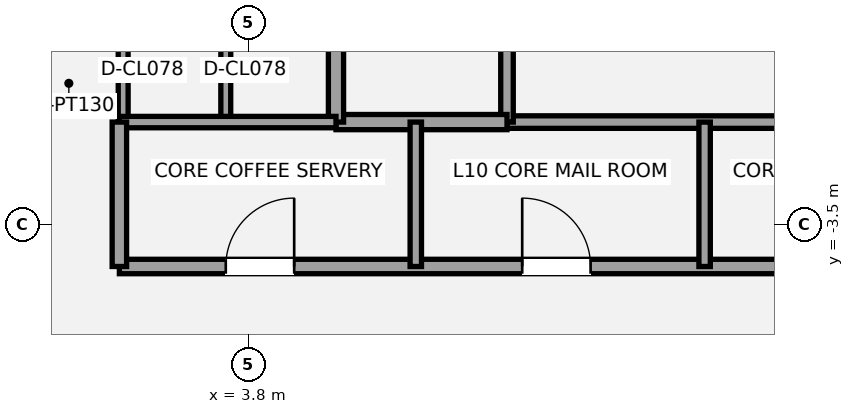
"""IFC4 building model, lengths in metres.
Left out: names, types, materials, properties, quantities, classifications, styles, units other than length and angle.
Written with IfcOpenShell. Run it as: python <this file> out.ifc"""

import sys

from ifc_helpers import new_model, si_unit, direction, frame, frame_2d, origin, place, context, subcontext, project, spatial, rectangle, extrude, element, fill, save


model = new_model("IFC4")
c1 = context("Model", 3, precision=1e-05, world=origin(), true_north=direction((0.0, 1.0)))
c2 = subcontext(c1, "Body", "Model", "MODEL_VIEW")
j1 = project(units=[si_unit("LENGTHUNIT", "METRE"), si_unit("PLANEANGLEUNIT", "RADIAN")], contexts=[c1])
p1 = place(None, origin())
s1 = spatial("IfcSite", under=j1, at=p1, CompositionType="ELEMENT")
p2 = place(p1, origin())
s2 = spatial("IfcBuilding", under=s1, at=p2, CompositionType="ELEMENT")
p3 = place(p2, frame((0.0, 0.0, 41.4)))
s3 = spatial("IfcBuildingStorey", under=s2, at=p3, CompositionType="ELEMENT", Elevation=41.4)
p4 = place(p3, frame((7.2, -2.15, 0.0), z_axis=(0.0, 0.0, 1.0), x_axis=(1.0, 0.0, 0.0)))
e1 = element("IfcWall", 1, at=p4, inside=s3, PredefinedType="PARTITIONING", context=c2, shape_type="SweptSolid", body=[
    extrude(rectangle(XDim=6.25, YDim=0.165, at=frame_2d((3.125, 0.0))), origin(), (0.0, 0.0, 1.0), 3.4),
])
p5 = place(p3, frame((7.2, -2.15, 0.0), z_axis=(0.0, 0.0, 1.0), x_axis=(0.0, 1.0, 0.0)))
e2 = element("IfcWall", 2, at=p5, inside=s3, PredefinedType="PARTITIONING", context=c2, shape_type="SweptSolid", body=[
    extrude(rectangle(XDim=3.15, YDim=0.165, at=frame_2d((1.575, 0.0))), origin(), (0.0, 0.0, 1.0), 2.853),
])
p6 = place(p3, frame((4.95, -2.15, 0.0), z_axis=(0.0, 0.0, 1.0), x_axis=(1.0, 0.0, 0.0)))
e3 = element("IfcWall", 3, at=p6, inside=s3, PredefinedType="SOLIDWALL", context=c2, shape_type="SweptSolid", body=[
    extrude(rectangle(XDim=2.25, YDim=0.2, at=frame_2d((1.125, 0.0))), origin(), (0.0, 0.0, 1.0), 3.4),
])
p7 = place(p3, frame((4.95, -2.15, 0.0), z_axis=(0.0, 0.0, 1.0), x_axis=(0.0, 1.0, 0.0)))
e4 = element("IfcWall", 4, at=p7, inside=s3, PredefinedType="SOLIDWALL", context=c2, shape_type="SweptSolid", body=[
    extrude(rectangle(XDim=3.15, YDim=0.2, at=frame_2d((1.575, 0.0))), origin(), (0.0, 0.0, 1.0), 3.4),
])
p8 = place(p7, frame((0.95, 0.0, 0.0)))
e5 = element("IfcOpeningElement", 5, at=p8, cuts=e4, PredefinedType="OPENING", context=c2, shape_type="SweptSolid", body=[
    extrude(rectangle(XDim=0.75, YDim=2.1, at=frame_2d((0.375, 1.05))), frame((0.0, 0.11, 0.0), z_axis=(0.0, -1.0, 0.0), x_axis=(1.0, 0.0, 0.0)), (0.0, 0.0, 1.0), 0.22),
])
for number, where, z_axis, x_axis in (
    (6, (2.15, -2.15, 0.0), (0.0, 0.0, 1.0), (0.0, 1.0, 0.0)),
    (7, (3.5, -2.15, 0.0), (0.0, 0.0, 1.0), (0.0, 1.0, 0.0)),
):
    element("IfcWall", number, at=place(p3, frame(where, z_axis=z_axis, x_axis=x_axis)), inside=s3, PredefinedType="PARTITIONING", context=c2, shape_type="SweptSolid", body=[
        extrude(rectangle(XDim=1.8, YDim=0.13, at=frame_2d((0.9, 0.0))), origin(), (0.0, 0.0, 1.0), 3.4),
    ])
p9 = place(p3, frame((2.1, -4.05, 0.0), z_axis=(0.0, 0.0, 1.0), x_axis=(1.0, 0.0, 0.0)))
e8 = element("IfcWall", 8, at=p9, inside=s3, PredefinedType="PLUMBINGWALL", context=c2, shape_type="SweptSolid", body=[
    extrude(rectangle(XDim=11.35, YDim=0.19, at=frame_2d((5.675, 0.0))), origin(), (0.0, 0.0, 1.0), 2.933),
])
p10 = place(p9, frame((1.4, 0.0, 0.0)))
e9 = element("IfcOpeningElement", 9, at=p10, cuts=e8, PredefinedType="OPENING", context=c2, shape_type="SweptSolid", body=[
    extrude(rectangle(XDim=0.9, YDim=2.1, at=frame_2d((0.45, 1.05))), frame((0.0, 0.105, 0.0), z_axis=(0.0, -1.0, 0.0), x_axis=(1.0, 0.0, 0.0)), (0.0, 0.0, 1.0), 0.21),
])
p11 = place(p9, frame((5.3, 0.0, 0.0)))
e10 = element("IfcOpeningElement", 10, at=p11, cuts=e8, PredefinedType="OPENING", context=c2, shape_type="SweptSolid", body=[
    extrude(rectangle(XDim=0.9, YDim=2.1, at=frame_2d((0.45, 1.05))), frame((0.0, 0.105, 0.0), z_axis=(0.0, -1.0, 0.0), x_axis=(1.0, 0.0, 0.0)), (0.0, 0.0, 1.0), 0.21),
])
p12 = place(p9, frame((9.1, 0.0, 0.0)))
e11 = element("IfcOpeningElement", 11, at=p12, cuts=e8, PredefinedType="OPENING", context=c2, shape_type="SweptSolid", body=[
    extrude(rectangle(XDim=0.9, YDim=2.1, at=frame_2d((0.45, 1.05))), frame((0.0, 0.105, 0.0), z_axis=(0.0, -1.0, 0.0), x_axis=(1.0, 0.0, 0.0)), (0.0, 0.0, 1.0), 0.21),
])
p13 = place(p3, frame((2.1, -2.15, 0.0), z_axis=(0.0, 0.0, 1.0), x_axis=(1.0, 0.0, 0.0)))
e12 = element("IfcWall", 12, at=p13, inside=s3, PredefinedType="PLUMBINGWALL", context=c2, shape_type="SweptSolid", body=[
    extrude(rectangle(XDim=2.85, YDim=0.15, at=frame_2d((1.425, 0.0))), origin(), (0.0, 0.0, 1.0), 3.4),
])
p14 = place(p3, frame((2.1, -4.05, 0.0), z_axis=(0.0, 0.0, 1.0), x_axis=(0.0, 1.0, 0.0)))
e13 = element("IfcWall", 13, at=p14, inside=s3, PredefinedType="PLUMBINGWALL", context=c2, shape_type="SweptSolid", body=[
    extrude(rectangle(XDim=1.9, YDim=0.19, at=frame_2d((0.95, 0.0))), origin(), (0.0, 0.0, 1.0), 3.4),
])
p15 = place(p3, frame((6.0, -4.05, 0.0), z_axis=(0.0, 0.0, 1.0), x_axis=(0.0, 1.0, 0.0)))
e14 = element("IfcWall", 14, at=p15, inside=s3, PredefinedType="PLUMBINGWALL", context=c2, shape_type="SweptSolid", body=[
    extrude(rectangle(XDim=1.9, YDim=0.15, at=frame_2d((0.95, 0.0))), origin(), (0.0, 0.0, 1.0), 2.841),
])
p16 = place(p3, frame((9.8, -4.05, 0.0), z_axis=(0.0, 0.0, 1.0), x_axis=(0.0, 1.0, 0.0)))
e15 = element("IfcWall", 15, at=p16, inside=s3, PredefinedType="PLUMBINGWALL", context=c2, shape_type="SweptSolid", body=[
    extrude(rectangle(XDim=1.9, YDim=0.15, at=frame_2d((0.95, 0.0))), origin(), (0.0, 0.0, 1.0), 2.853),
])
p17 = place(p10, origin())
e16 = element("IfcDoor", 16, at=p17, inside=s3, OperationType="SINGLE_SWING_RIGHT", PredefinedType="DOOR", context=c2, shape_type="SweptSolid", body=[
    extrude(rectangle(XDim=0.9, YDim=2.1, at=frame_2d((0.45, 1.05))), frame((0.0, 0.025, 0.0), z_axis=(0.0, -1.0, 0.0), x_axis=(1.0, 0.0, 0.0)), (0.0, 0.0, 1.0), 0.05),
])
fill(e9, e16)
p18 = place(p11, origin())
e17 = element("IfcDoor", 17, at=p18, inside=s3, OperationType="SINGLE_SWING_LEFT", PredefinedType="DOOR", context=c2, shape_type="SweptSolid", body=[
    extrude(rectangle(XDim=0.9, YDim=2.1, at=frame_2d((0.45, 1.05))), frame((0.0, 0.025, 0.0), z_axis=(0.0, -1.0, 0.0), x_axis=(1.0, 0.0, 0.0)), (0.0, 0.0, 1.0), 0.05),
])
fill(e10, e17)
save(model, sys.argv[1])
